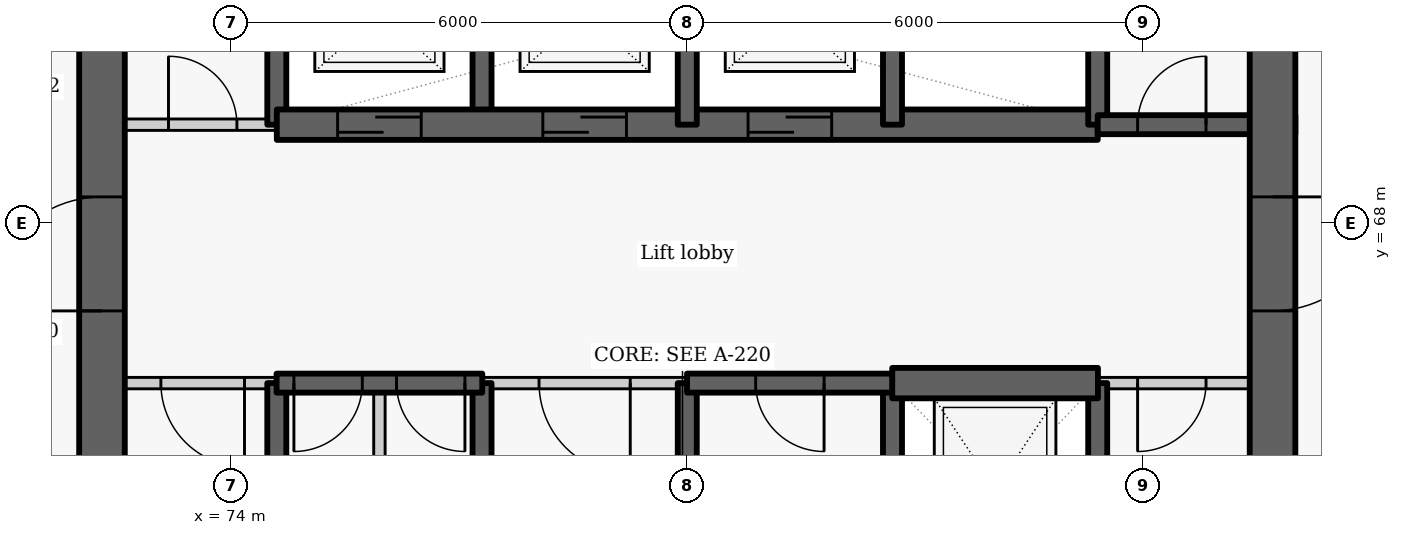
"""IFC4 building model, lengths in metres.
Left out: names, types, materials, properties, quantities, classifications, styles, units other than length and angle.
Written with IfcOpenShell. Run it as: python <this file> out.ifc"""

import sys

from ifc_helpers import new_model, si_unit, direction, frame, frame_2d, origin, place, context, subcontext, project, spatial, rectangle, extrude, element, fill, save


model = new_model("IFC4")
c1 = context("Model", 3, precision=1e-05, world=origin(), true_north=direction((0.0, 1.0)))
c2 = subcontext(c1, "Body", "Model", "MODEL_VIEW")
j1 = project(units=[si_unit("LENGTHUNIT", "METRE"), si_unit("PLANEANGLEUNIT", "RADIAN")], contexts=[c1])
p1 = place(None, origin())
s1 = spatial("IfcSite", under=j1, at=p1, CompositionType="ELEMENT")
p2 = place(p1, origin())
s2 = spatial("IfcBuilding", under=s1, at=p2, CompositionType="ELEMENT")
p3 = place(p2, frame((0.0, 0.0, 107.4)))
s3 = spatial("IfcBuildingStorey", under=s2, at=p3, CompositionType="ELEMENT", Elevation=107.4)
p4 = place(p3, frame((74.6, 63.1, -0.275), z_axis=(0.0, 0.0, 1.0), x_axis=(0.0, 1.0, 0.0)))
e1 = element("IfcWall", 1, at=p4, inside=s3, PredefinedType="SHEAR", context=c2, shape_type="SweptSolid", body=[
    extrude(rectangle(XDim=2.8, YDim=0.25, at=frame_2d((1.4, 0.0))), origin(), (0.0, 0.0, 1.0), 3.3),
])
p5 = place(p3, frame((74.6, 69.3, -0.275), z_axis=(0.0, 0.0, 1.0), x_axis=(0.0, 1.0, 0.0)))
e2 = element("IfcWall", 2, at=p5, inside=s3, PredefinedType="SHEAR", context=c2, shape_type="SweptSolid", body=[
    extrude(rectangle(XDim=2.9, YDim=0.25, at=frame_2d((1.45, 0.0))), origin(), (0.0, 0.0, 1.0), 3.3),
])
p6 = place(p3, frame((72.0, 69.3, 0.0), z_axis=(0.0, 0.0, 1.0), x_axis=(1.0, 0.0, 0.0)))
e3 = element("IfcWall", 3, at=p6, inside=s3, PredefinedType="PARTITIONING", context=c2, shape_type="SweptSolid", body=[
    extrude(rectangle(XDim=2.6, YDim=0.15, at=frame_2d((1.3, 0.0))), origin(), (0.0, 0.0, 1.0), 3.025),
])
p7 = place(p6, frame((1.175, 0.0, 0.0)))
e4 = element("IfcOpeningElement", 4, at=p7, cuts=e3, PredefinedType="OPENING", context=c2, shape_type="SweptSolid", body=[
    extrude(rectangle(XDim=0.9, YDim=2.1, at=frame_2d((0.45, 1.05))), frame((0.0, 0.085, 0.0), z_axis=(0.0, -1.0, 0.0), x_axis=(1.0, 0.0, 0.0)), (0.0, 0.0, 1.0), 0.17),
])
p8 = place(p3, frame((72.3, 63.1, -0.275), z_axis=(0.0, 0.0, 1.0), x_axis=(0.0, 1.0, 0.0)))
e5 = element("IfcWall", 5, at=p8, inside=s3, PredefinedType="SHEAR", context=c2, shape_type="SweptSolid", body=[
    extrude(rectangle(XDim=9.1, YDim=0.6, at=frame_2d((4.55, 0.0))), origin(), (0.0, 0.0, 1.0), 3.3),
])
p9 = place(p8, frame((3.75, 0.0, 0.275)))
e6 = element("IfcOpeningElement", 6, at=p9, cuts=e5, PredefinedType="OPENING", context=c2, shape_type="SweptSolid", body=[
    extrude(rectangle(XDim=1.5, YDim=2.1, at=frame_2d((0.75, 1.05))), frame((0.0, 0.31, 0.0), z_axis=(0.0, -1.0, 0.0), x_axis=(1.0, 0.0, 0.0)), (0.0, 0.0, 1.0), 0.62),
])
p10 = place(p3, frame((77.3, 63.1, -0.275), z_axis=(0.0, 0.0, 1.0), x_axis=(0.0, 1.0, 0.0)))
e7 = element("IfcWall", 7, at=p10, inside=s3, PredefinedType="SHEAR", context=c2, shape_type="SweptSolid", body=[
    extrude(rectangle(XDim=2.8, YDim=0.25, at=frame_2d((1.4, 0.0))), origin(), (0.0, 0.0, 1.0), 3.3),
])
p11 = place(p3, frame((77.3, 69.3, -0.275), z_axis=(0.0, 0.0, 1.0), x_axis=(0.0, 1.0, 0.0)))
e8 = element("IfcWall", 8, at=p11, inside=s3, PredefinedType="SHEAR", context=c2, shape_type="SweptSolid", body=[
    extrude(rectangle(XDim=2.9, YDim=0.25, at=frame_2d((1.45, 0.0))), origin(), (0.0, 0.0, 1.0), 3.3),
])
p12 = place(p3, frame((74.6, 69.3, -0.275), z_axis=(0.0, 0.0, 1.0), x_axis=(1.0, 0.0, 0.0)))
e9 = element("IfcWall", 9, at=p12, inside=s3, PredefinedType="SHEAR", context=c2, shape_type="SweptSolid", body=[
    extrude(rectangle(XDim=10.8, YDim=0.4, at=frame_2d((5.4, 0.0))), origin(), (0.0, 0.0, 1.0), 3.3),
])
p13 = place(p12, frame((0.8, 0.0, 0.275)))
e10 = element("IfcOpeningElement", 10, at=p13, cuts=e9, PredefinedType="OPENING", context=c2, shape_type="SweptSolid", body=[
    extrude(rectangle(XDim=1.1, YDim=2.1, at=frame_2d((0.55, 1.05))), frame((0.0, 0.21, 0.0), z_axis=(0.0, -1.0, 0.0), x_axis=(1.0, 0.0, 0.0)), (0.0, 0.0, 1.0), 0.42),
])
p14 = place(p12, frame((3.5, 0.0, 0.275)))
e11 = element("IfcOpeningElement", 11, at=p14, cuts=e9, PredefinedType="OPENING", context=c2, shape_type="SweptSolid", body=[
    extrude(rectangle(XDim=1.1, YDim=2.1, at=frame_2d((0.55, 1.05))), frame((0.0, 0.21, 0.0), z_axis=(0.0, -1.0, 0.0), x_axis=(1.0, 0.0, 0.0)), (0.0, 0.0, 1.0), 0.42),
])
p15 = place(p12, frame((6.2, 0.0, 0.275)))
e12 = element("IfcOpeningElement", 12, at=p15, cuts=e9, PredefinedType="OPENING", context=c2, shape_type="SweptSolid", body=[
    extrude(rectangle(XDim=1.1, YDim=2.1, at=frame_2d((0.55, 1.05))), frame((0.0, 0.21, 0.0), z_axis=(0.0, -1.0, 0.0), x_axis=(1.0, 0.0, 0.0)), (0.0, 0.0, 1.0), 0.42),
])
p16 = place(p3, frame((80.0, 63.1, -0.275), z_axis=(0.0, 0.0, 1.0), x_axis=(0.0, 1.0, 0.0)))
e13 = element("IfcWall", 13, at=p16, inside=s3, PredefinedType="SHEAR", context=c2, shape_type="SweptSolid", body=[
    extrude(rectangle(XDim=2.8, YDim=0.25, at=frame_2d((1.4, 0.0))), origin(), (0.0, 0.0, 1.0), 3.3),
])
p17 = place(p3, frame((80.0, 69.3, -0.275), z_axis=(0.0, 0.0, 1.0), x_axis=(0.0, 1.0, 0.0)))
e14 = element("IfcWall", 14, at=p17, inside=s3, PredefinedType="SHEAR", context=c2, shape_type="SweptSolid", body=[
    extrude(rectangle(XDim=2.9, YDim=0.25, at=frame_2d((1.45, 0.0))), origin(), (0.0, 0.0, 1.0), 3.3),
])
p18 = place(p3, frame((82.7, 63.1, -0.275), z_axis=(0.0, 0.0, 1.0), x_axis=(0.0, 1.0, 0.0)))
e15 = element("IfcWall", 15, at=p18, inside=s3, PredefinedType="SHEAR", context=c2, shape_type="SweptSolid", body=[
    extrude(rectangle(XDim=2.8, YDim=0.25, at=frame_2d((1.4, 0.0))), origin(), (0.0, 0.0, 1.0), 3.3),
])
p19 = place(p3, frame((82.7, 69.3, -0.275), z_axis=(0.0, 0.0, 1.0), x_axis=(0.0, 1.0, 0.0)))
e16 = element("IfcWall", 16, at=p19, inside=s3, PredefinedType="SHEAR", context=c2, shape_type="SweptSolid", body=[
    extrude(rectangle(XDim=2.9, YDim=0.25, at=frame_2d((1.45, 0.0))), origin(), (0.0, 0.0, 1.0), 3.3),
])
p20 = place(p3, frame((85.4, 63.1, -0.275), z_axis=(0.0, 0.0, 1.0), x_axis=(0.0, 1.0, 0.0)))
e17 = element("IfcWall", 17, at=p20, inside=s3, PredefinedType="SHEAR", context=c2, shape_type="SweptSolid", body=[
    extrude(rectangle(XDim=2.8, YDim=0.25, at=frame_2d((1.4, 0.0))), origin(), (0.0, 0.0, 1.0), 3.3),
])
p21 = place(p3, frame((85.4, 69.3, -0.275), z_axis=(0.0, 0.0, 1.0), x_axis=(0.0, 1.0, 0.0)))
e18 = element("IfcWall", 18, at=p21, inside=s3, PredefinedType="SHEAR", context=c2, shape_type="SweptSolid", body=[
    extrude(rectangle(XDim=2.9, YDim=0.25, at=frame_2d((1.45, 0.0))), origin(), (0.0, 0.0, 1.0), 3.3),
])
p22 = place(p3, frame((85.4, 69.3, -0.275), z_axis=(0.0, 0.0, 1.0), x_axis=(1.0, 0.0, 0.0)))
e19 = element("IfcWall", 19, at=p22, inside=s3, PredefinedType="SHEAR", context=c2, shape_type="SweptSolid", body=[
    extrude(rectangle(XDim=2.6, YDim=0.25, at=frame_2d((1.3, 0.0))), origin(), (0.0, 0.0, 1.0), 3.3),
])
p23 = place(p22, frame((0.525, 0.0, 0.275)))
e20 = element("IfcOpeningElement", 20, at=p23, cuts=e19, PredefinedType="OPENING", context=c2, shape_type="SweptSolid", body=[
    extrude(rectangle(XDim=0.9, YDim=2.1, at=frame_2d((0.45, 1.05))), frame((0.0, 0.135, 0.0), z_axis=(0.0, -1.0, 0.0), x_axis=(1.0, 0.0, 0.0)), (0.0, 0.0, 1.0), 0.27),
])
p24 = place(p3, frame((87.7, 72.2, -0.275), z_axis=(0.0, 0.0, 1.0), x_axis=(0.0, -1.0, 0.0)))
e21 = element("IfcWall", 21, at=p24, inside=s3, PredefinedType="SHEAR", context=c2, shape_type="SweptSolid", body=[
    extrude(rectangle(XDim=15.6, YDim=0.6, at=frame_2d((7.8, 0.0))), origin(), (0.0, 0.0, 1.0), 3.3),
])
p25 = place(p24, frame((3.85, 0.0, 0.275)))
e22 = element("IfcOpeningElement", 22, at=p25, cuts=e21, PredefinedType="OPENING", context=c2, shape_type="SweptSolid", body=[
    extrude(rectangle(XDim=1.5, YDim=2.1, at=frame_2d((0.75, 1.05))), frame((0.0, 0.31, 0.0), z_axis=(0.0, -1.0, 0.0), x_axis=(1.0, 0.0, 0.0)), (0.0, 0.0, 1.0), 0.62),
])
p26 = place(p24, frame((11.8, 0.0, 0.275)))
e23 = element("IfcOpeningElement", 23, at=p26, cuts=e21, PredefinedType="OPENING", context=c2, shape_type="SweptSolid", body=[
    extrude(rectangle(XDim=1.1, YDim=2.1, at=frame_2d((0.55, 1.05))), frame((0.0, 0.31, 0.0), z_axis=(0.0, -1.0, 0.0), x_axis=(1.0, 0.0, 0.0)), (0.0, 0.0, 1.0), 0.62),
])
p27 = place(p3, frame((74.603, 65.9, 0.0), z_axis=(0.0, 0.0, 1.0), x_axis=(-1.0, 0.0, 0.0)))
e24 = element("IfcWall", 24, at=p27, inside=s3, PredefinedType="PARTITIONING", context=c2, shape_type="SweptSolid", body=[
    extrude(rectangle(XDim=2.603, YDim=0.15, at=frame_2d((1.302, 0.0))), origin(), (0.0, 0.0, 1.0), 3.025),
])
p28 = place(p27, frame((0.428, 0.0, 0.0)))
e25 = element("IfcOpeningElement", 25, at=p28, cuts=e24, PredefinedType="OPENING", context=c2, shape_type="SweptSolid", body=[
    extrude(rectangle(XDim=1.1, YDim=2.1, at=frame_2d((0.55, 1.05))), frame((0.0, 0.085, 0.0), z_axis=(0.0, -1.0, 0.0), x_axis=(1.0, 0.0, 0.0)), (0.0, 0.0, 1.0), 0.17),
])
p29 = place(p3, frame((80.003, 65.9, 0.0), z_axis=(0.0, 0.0, 1.0), x_axis=(-1.0, 0.0, 0.0)))
e26 = element("IfcWall", 26, at=p29, inside=s3, PredefinedType="PARTITIONING", context=c2, shape_type="SweptSolid", body=[
    extrude(rectangle(XDim=2.706, YDim=0.15, at=frame_2d((1.353, 0.0))), origin(), (0.0, 0.0, 1.0), 3.025),
])
p30 = place(p29, frame((0.753, 0.0, 0.0)))
e27 = element("IfcOpeningElement", 27, at=p30, cuts=e26, PredefinedType="OPENING", context=c2, shape_type="SweptSolid", body=[
    extrude(rectangle(XDim=1.2, YDim=2.1, at=frame_2d((0.6, 1.05))), frame((0.0, 0.085, 0.0), z_axis=(0.0, -1.0, 0.0), x_axis=(1.0, 0.0, 0.0)), (0.0, 0.0, 1.0), 0.17),
])
p31 = place(p3, frame((88.0, 65.9, 0.0), z_axis=(0.0, 0.0, 1.0), x_axis=(-1.0, 0.0, 0.0)))
e28 = element("IfcWall", 28, at=p31, inside=s3, PredefinedType="PARTITIONING", context=c2, shape_type="SweptSolid", body=[
    extrude(rectangle(XDim=2.603, YDim=0.15, at=frame_2d((1.302, 0.0))), origin(), (0.0, 0.0, 1.0), 3.025),
])
p32 = place(p31, frame((1.175, 0.0, 0.0)))
e29 = element("IfcOpeningElement", 29, at=p32, cuts=e28, PredefinedType="OPENING", context=c2, shape_type="SweptSolid", body=[
    extrude(rectangle(XDim=0.9, YDim=2.1, at=frame_2d((0.45, 1.05))), frame((0.0, 0.085, 0.0), z_axis=(0.0, -1.0, 0.0), x_axis=(1.0, 0.0, 0.0)), (0.0, 0.0, 1.0), 0.17),
])
p33 = place(p3, frame((77.303, 65.9, -0.275), z_axis=(0.0, 0.0, 1.0), x_axis=(-1.0, 0.0, 0.0)))
e30 = element("IfcWall", 30, at=p33, inside=s3, PredefinedType="SHEAR", context=c2, shape_type="SweptSolid", body=[
    extrude(rectangle(XDim=2.706, YDim=0.25, at=frame_2d((1.353, 0.0))), origin(), (0.0, 0.0, 1.0), 3.3),
])
p34 = place(p33, frame((1.578, 0.0, 0.275)))
e31 = element("IfcOpeningElement", 31, at=p34, cuts=e30, PredefinedType="OPENING", context=c2, shape_type="SweptSolid", body=[
    extrude(rectangle(XDim=0.9, YDim=2.1, at=frame_2d((0.45, 1.05))), frame((0.0, 0.135, 0.0), z_axis=(0.0, -1.0, 0.0), x_axis=(1.0, 0.0, 0.0)), (0.0, 0.0, 1.0), 0.27),
])
p35 = place(p33, frame((0.228, 0.0, 0.275)))
e32 = element("IfcOpeningElement", 32, at=p35, cuts=e30, PredefinedType="OPENING", context=c2, shape_type="SweptSolid", body=[
    extrude(rectangle(XDim=0.9, YDim=2.1, at=frame_2d((0.45, 1.05))), frame((0.0, 0.135, 0.0), z_axis=(0.0, -1.0, 0.0), x_axis=(1.0, 0.0, 0.0)), (0.0, 0.0, 1.0), 0.27),
])
p36 = place(p3, frame((82.703, 65.9, -0.275), z_axis=(0.0, 0.0, 1.0), x_axis=(-1.0, 0.0, 0.0)))
e33 = element("IfcWall", 33, at=p36, inside=s3, PredefinedType="SHEAR", context=c2, shape_type="SweptSolid", body=[
    extrude(rectangle(XDim=2.706, YDim=0.25, at=frame_2d((1.353, 0.0))), origin(), (0.0, 0.0, 1.0), 3.3),
])
p37 = place(p36, frame((0.903, 0.0, 0.275)))
e34 = element("IfcOpeningElement", 34, at=p37, cuts=e33, PredefinedType="OPENING", context=c2, shape_type="SweptSolid", body=[
    extrude(rectangle(XDim=0.9, YDim=2.1, at=frame_2d((0.45, 1.05))), frame((0.0, 0.135, 0.0), z_axis=(0.0, -1.0, 0.0), x_axis=(1.0, 0.0, 0.0)), (0.0, 0.0, 1.0), 0.27),
])
p38 = place(p3, frame((82.697, 65.9, -0.275), z_axis=(0.0, 0.0, 1.0), x_axis=(1.0, 0.0, 0.0)))
e35 = element("IfcWall", 35, at=p38, inside=s3, PredefinedType="SHEAR", context=c2, shape_type="SweptSolid", body=[
    extrude(rectangle(XDim=2.706, YDim=0.4, at=frame_2d((1.353, 0.0))), origin(), (0.0, 0.0, 1.0), 3.3),
])
p39 = place(p3, frame((75.95, 63.1, 0.0), z_axis=(0.0, 0.0, 1.0), x_axis=(0.0, 1.0, 0.0)))
e36 = element("IfcWall", 36, at=p39, inside=s3, PredefinedType="PARTITIONING", context=c2, shape_type="SweptSolid", body=[
    extrude(rectangle(XDim=2.8, YDim=0.15, at=frame_2d((1.4, 0.0))), origin(), (0.0, 0.0, 1.0), 3.025),
])
p40 = place(p7, origin())
e37 = element("IfcDoor", 37, at=p40, inside=s3, OperationType="SINGLE_SWING_LEFT", PredefinedType="DOOR", context=c2, shape_type="SweptSolid", body=[
    extrude(rectangle(XDim=0.9, YDim=2.1, at=frame_2d((0.45, 1.05))), frame((0.0, 0.025, 0.0), z_axis=(0.0, -1.0, 0.0), x_axis=(1.0, 0.0, 0.0)), (0.0, 0.0, 1.0), 0.05),
])
fill(e4, e37)
p41 = place(p13, origin())
e38 = element("IfcDoor", 38, at=p41, inside=s3, OperationType="SLIDING_TO_LEFT", PredefinedType="DOOR", context=c2, shape_type="SweptSolid", body=[
    extrude(rectangle(XDim=1.1, YDim=2.1, at=frame_2d((0.55, 1.05))), frame((0.0, 0.025, 0.0), z_axis=(0.0, -1.0, 0.0), x_axis=(1.0, 0.0, 0.0)), (0.0, 0.0, 1.0), 0.05),
])
fill(e10, e38)
p42 = place(p14, origin())
e39 = element("IfcDoor", 39, at=p42, inside=s3, OperationType="SLIDING_TO_LEFT", PredefinedType="DOOR", context=c2, shape_type="SweptSolid", body=[
    extrude(rectangle(XDim=1.1, YDim=2.1, at=frame_2d((0.55, 1.05))), frame((0.0, 0.025, 0.0), z_axis=(0.0, -1.0, 0.0), x_axis=(1.0, 0.0, 0.0)), (0.0, 0.0, 1.0), 0.05),
])
fill(e11, e39)
p43 = place(p15, origin())
e40 = element("IfcDoor", 40, at=p43, inside=s3, OperationType="SLIDING_TO_LEFT", PredefinedType="DOOR", context=c2, shape_type="SweptSolid", body=[
    extrude(rectangle(XDim=1.1, YDim=2.1, at=frame_2d((0.55, 1.05))), frame((0.0, 0.025, 0.0), z_axis=(0.0, -1.0, 0.0), x_axis=(1.0, 0.0, 0.0)), (0.0, 0.0, 1.0), 0.05),
])
fill(e12, e40)
p44 = place(p23, origin())
e41 = element("IfcDoor", 41, at=p44, inside=s3, OperationType="SINGLE_SWING_RIGHT", PredefinedType="DOOR", context=c2, shape_type="SweptSolid", body=[
    extrude(rectangle(XDim=0.9, YDim=2.1, at=frame_2d((0.45, 1.05))), frame((0.0, 0.025, 0.0), z_axis=(0.0, -1.0, 0.0), x_axis=(1.0, 0.0, 0.0)), (0.0, 0.0, 1.0), 0.05),
])
fill(e20, e41)
p45 = place(p28, origin())
e42 = element("IfcDoor", 42, at=p45, inside=s3, OperationType="SINGLE_SWING_LEFT", PredefinedType="DOOR", context=c2, shape_type="SweptSolid", body=[
    extrude(rectangle(XDim=1.1, YDim=2.1, at=frame_2d((0.55, 1.05))), frame((0.0, 0.025, 0.0), z_axis=(0.0, -1.0, 0.0), x_axis=(1.0, 0.0, 0.0)), (0.0, 0.0, 1.0), 0.05),
])
fill(e25, e42)
p46 = place(p34, origin())
e43 = element("IfcDoor", 43, at=p46, inside=s3, OperationType="SINGLE_SWING_RIGHT", PredefinedType="DOOR", context=c2, shape_type="SweptSolid", body=[
    extrude(rectangle(XDim=0.9, YDim=2.1, at=frame_2d((0.45, 1.05))), frame((0.0, 0.025, 0.0), z_axis=(0.0, -1.0, 0.0), x_axis=(1.0, 0.0, 0.0)), (0.0, 0.0, 1.0), 0.05),
])
fill(e31, e43)
p47 = place(p35, origin())
e44 = element("IfcDoor", 44, at=p47, inside=s3, OperationType="SINGLE_SWING_LEFT", PredefinedType="DOOR", context=c2, shape_type="SweptSolid", body=[
    extrude(rectangle(XDim=0.9, YDim=2.1, at=frame_2d((0.45, 1.05))), frame((0.0, 0.025, 0.0), z_axis=(0.0, -1.0, 0.0), x_axis=(1.0, 0.0, 0.0)), (0.0, 0.0, 1.0), 0.05),
])
fill(e32, e44)
p48 = place(p30, origin())
e45 = element("IfcDoor", 45, at=p48, inside=s3, OperationType="DOUBLE_DOOR_SINGLE_SWING", PredefinedType="DOOR", context=c2, shape_type="SweptSolid", body=[
    extrude(rectangle(XDim=1.2, YDim=2.1, at=frame_2d((0.6, 1.05))), frame((0.0, 0.025, 0.0), z_axis=(0.0, -1.0, 0.0), x_axis=(1.0, 0.0, 0.0)), (0.0, 0.0, 1.0), 0.05),
])
fill(e27, e45)
p49 = place(p37, origin())
e46 = element("IfcDoor", 46, at=p49, inside=s3, OperationType="SINGLE_SWING_LEFT", PredefinedType="DOOR", context=c2, shape_type="SweptSolid", body=[
    extrude(rectangle(XDim=0.9, YDim=2.1, at=frame_2d((0.45, 1.05))), frame((0.0, 0.025, 0.0), z_axis=(0.0, -1.0, 0.0), x_axis=(1.0, 0.0, 0.0)), (0.0, 0.0, 1.0), 0.05),
])
fill(e34, e46)
p50 = place(p32, origin())
e47 = element("IfcDoor", 47, at=p50, inside=s3, OperationType="SINGLE_SWING_RIGHT", PredefinedType="DOOR", context=c2, shape_type="SweptSolid", body=[
    extrude(rectangle(XDim=0.9, YDim=2.1, at=frame_2d((0.45, 1.05))), frame((0.0, 0.025, 0.0), z_axis=(0.0, -1.0, 0.0), x_axis=(1.0, 0.0, 0.0)), (0.0, 0.0, 1.0), 0.05),
])
fill(e29, e47)
p51 = place(p25, origin())
e48 = element("IfcDoor", 48, at=p51, inside=s3, OperationType="DOUBLE_DOOR_SINGLE_SWING", PredefinedType="DOOR", context=c2, shape_type="SweptSolid", body=[
    extrude(rectangle(XDim=1.5, YDim=2.1, at=frame_2d((0.75, 1.05))), frame((0.0, 0.025, 0.0), z_axis=(0.0, -1.0, 0.0), x_axis=(1.0, 0.0, 0.0)), (0.0, 0.0, 1.0), 0.05),
])
fill(e22, e48)
p52 = place(p9, origin())
e49 = element("IfcDoor", 49, at=p52, inside=s3, OperationType="DOUBLE_DOOR_SINGLE_SWING", PredefinedType="DOOR", context=c2, shape_type="SweptSolid", body=[
    extrude(rectangle(XDim=1.5, YDim=2.1, at=frame_2d((0.75, 1.05))), frame((0.0, 0.025, 0.0), z_axis=(0.0, -1.0, 0.0), x_axis=(1.0, 0.0, 0.0)), (0.0, 0.0, 1.0), 0.05),
])
fill(e6, e49)
save(model, sys.argv[1])
